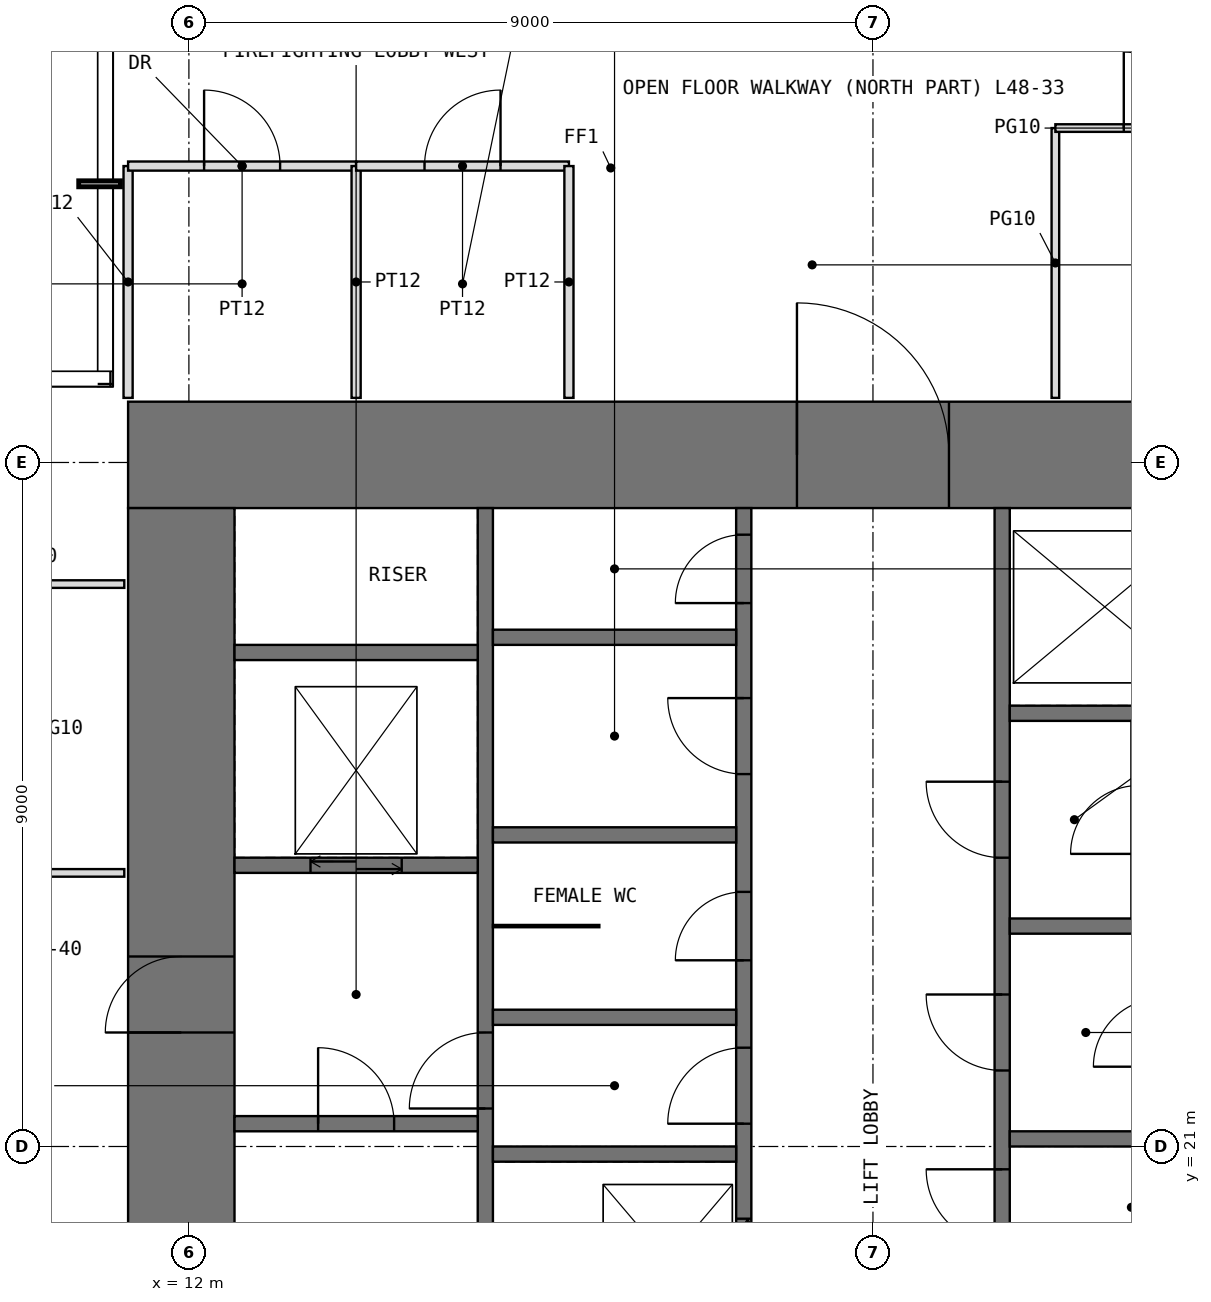
"""IFC4 building model, lengths in metres.
Left out: names, types, materials, properties, quantities, classifications, styles, units other than length and angle.
Written with IfcOpenShell. Run it as: python <this file> out.ifc"""

import sys

from ifc_helpers import new_model, si_unit, direction, frame, frame_2d, origin, place, context, subcontext, project, spatial, rectangle, extrude, element, fill, save


model = new_model("IFC4")
c1 = context("Model", 3, precision=1e-05, world=origin(), true_north=direction((0.0, 1.0)))
c2 = subcontext(c1, "Body", "Model", "MODEL_VIEW")
j1 = project(units=[si_unit("LENGTHUNIT", "METRE"), si_unit("PLANEANGLEUNIT", "RADIAN")], contexts=[c1])
p1 = place(None, origin())
s1 = spatial("IfcSite", under=j1, at=p1, CompositionType="ELEMENT")
p2 = place(p1, origin())
s2 = spatial("IfcBuilding", under=s1, at=p2, CompositionType="ELEMENT")
p3 = place(p2, frame((0.0, 0.0, 202.5)))
s3 = spatial("IfcBuildingStorey", under=s2, at=p3, CompositionType="ELEMENT", Elevation=202.5)
p4 = place(p3, frame((11.2, 30.1, -0.05), z_axis=(0.0, 0.0, 1.0), x_axis=(1.0, 0.0, 0.0)))
e1 = element("IfcWall", 1, at=p4, inside=s3, PredefinedType="SHEAR", context=c2, shape_type="SweptSolid", body=[
    extrude(rectangle(XDim=19.6, YDim=1.4, at=frame_2d((9.8, 0.0))), origin(), (0.0, 0.0, 1.0), 4.0),
])
p5 = place(p4, frame((8.8, 0.0, 0.05)))
e2 = element("IfcOpeningElement", 2, at=p5, cuts=e1, PredefinedType="OPENING", context=c2, shape_type="SweptSolid", body=[
    extrude(rectangle(XDim=2.0, YDim=2.2, at=frame_2d((1.0, 1.1))), frame((0.0, 0.71, 0.0), z_axis=(0.0, -1.0, 0.0), x_axis=(1.0, 0.0, 0.0)), (0.0, 0.0, 1.0), 1.42),
])
p6 = place(p3, frame((11.9, 12.6, -0.05), z_axis=(0.0, 0.0, 1.0), x_axis=(0.0, 1.0, 0.0)))
e3 = element("IfcWall", 3, at=p6, inside=s3, PredefinedType="SHEAR", context=c2, shape_type="SweptSolid", body=[
    extrude(rectangle(XDim=16.8, YDim=1.4, at=frame_2d((8.4, 0.0))), origin(), (0.0, 0.0, 1.0), 4.0),
])
p7 = place(p6, frame((9.9, 0.0, 0.05)))
e4 = element("IfcOpeningElement", 4, at=p7, cuts=e3, PredefinedType="OPENING", context=c2, shape_type="SweptSolid", body=[
    extrude(rectangle(XDim=1.0, YDim=2.2, at=frame_2d((0.5, 1.1))), frame((0.0, 0.71, 0.0), z_axis=(0.0, -1.0, 0.0), x_axis=(1.0, 0.0, 0.0)), (0.0, 0.0, 1.0), 1.42),
])
p8 = place(p3, frame((15.9, 12.6, -0.05), z_axis=(0.0, 0.0, 1.0), x_axis=(0.0, 1.0, 0.0)))
e5 = element("IfcWall", 5, at=p8, inside=s3, PredefinedType="SHEAR", context=c2, shape_type="SweptSolid", body=[
    extrude(rectangle(XDim=16.8, YDim=0.2, at=frame_2d((8.4, 0.0))), origin(), (0.0, 0.0, 1.0), 4.0),
])
p9 = place(p8, frame((8.9, 0.0, 0.05)))
e6 = element("IfcOpeningElement", 6, at=p9, cuts=e5, PredefinedType="OPENING", context=c2, shape_type="SweptSolid", body=[
    extrude(rectangle(XDim=1.0, YDim=2.2, at=frame_2d((0.5, 1.1))), frame((0.0, 0.11, 0.0), z_axis=(0.0, -1.0, 0.0), x_axis=(1.0, 0.0, 0.0)), (0.0, 0.0, 1.0), 0.22),
])
p10 = place(p3, frame((19.3, 12.6, -0.05), z_axis=(0.0, 0.0, 1.0), x_axis=(0.0, 1.0, 0.0)))
e7 = element("IfcWall", 7, at=p10, inside=s3, PredefinedType="SHEAR", context=c2, shape_type="SweptSolid", body=[
    extrude(rectangle(XDim=16.8, YDim=0.2, at=frame_2d((8.4, 0.0))), origin(), (0.0, 0.0, 1.0), 4.0),
])
p11 = place(p10, frame((8.7, 0.0, 0.05)))
e8 = element("IfcOpeningElement", 8, at=p11, cuts=e7, PredefinedType="OPENING", context=c2, shape_type="SweptSolid", body=[
    extrude(rectangle(XDim=1.0, YDim=2.2, at=frame_2d((0.5, 1.1))), frame((0.0, 0.11, 0.0), z_axis=(0.0, -1.0, 0.0), x_axis=(1.0, 0.0, 0.0)), (0.0, 0.0, 1.0), 0.22),
])
p12 = place(p10, frame((10.85, 0.0, 0.05)))
e9 = element("IfcOpeningElement", 9, at=p12, cuts=e7, PredefinedType="OPENING", context=c2, shape_type="SweptSolid", body=[
    extrude(rectangle(XDim=0.9, YDim=2.2, at=frame_2d((0.45, 1.1))), frame((0.0, 0.11, 0.0), z_axis=(0.0, -1.0, 0.0), x_axis=(1.0, 0.0, 0.0)), (0.0, 0.0, 1.0), 0.22),
])
p13 = place(p10, frame((13.3, 0.0, 0.05)))
e10 = element("IfcOpeningElement", 10, at=p13, cuts=e7, PredefinedType="OPENING", context=c2, shape_type="SweptSolid", body=[
    extrude(rectangle(XDim=1.0, YDim=2.2, at=frame_2d((0.5, 1.1))), frame((0.0, 0.11, 0.0), z_axis=(0.0, -1.0, 0.0), x_axis=(1.0, 0.0, 0.0)), (0.0, 0.0, 1.0), 0.22),
])
p14 = place(p10, frame((15.55, 0.0, 0.05)))
e11 = element("IfcOpeningElement", 11, at=p14, cuts=e7, PredefinedType="OPENING", context=c2, shape_type="SweptSolid", body=[
    extrude(rectangle(XDim=0.9, YDim=2.2, at=frame_2d((0.45, 1.1))), frame((0.0, 0.11, 0.0), z_axis=(0.0, -1.0, 0.0), x_axis=(1.0, 0.0, 0.0)), (0.0, 0.0, 1.0), 0.22),
])
p15 = place(p10, frame((0.75, 0.0, 0.05)))
e12 = element("IfcOpeningElement", 12, at=p15, cuts=e7, PredefinedType="OPENING", context=c2, shape_type="SweptSolid", body=[
    extrude(rectangle(XDim=1.1, YDim=2.2, at=frame_2d((0.55, 1.1))), frame((0.0, 0.11, 0.0), z_axis=(0.0, -1.0, 0.0), x_axis=(1.0, 0.0, 0.0)), (0.0, 0.0, 1.0), 0.22),
])
p16 = place(p10, frame((3.55, 0.0, 0.05)))
e13 = element("IfcOpeningElement", 13, at=p16, cuts=e7, PredefinedType="OPENING", context=c2, shape_type="SweptSolid", body=[
    extrude(rectangle(XDim=1.1, YDim=2.2, at=frame_2d((0.55, 1.1))), frame((0.0, 0.11, 0.0), z_axis=(0.0, -1.0, 0.0), x_axis=(1.0, 0.0, 0.0)), (0.0, 0.0, 1.0), 0.22),
])
p17 = place(p10, frame((6.35, 0.0, 0.05)))
e14 = element("IfcOpeningElement", 14, at=p17, cuts=e7, PredefinedType="OPENING", context=c2, shape_type="SweptSolid", body=[
    extrude(rectangle(XDim=1.1, YDim=2.2, at=frame_2d((0.55, 1.1))), frame((0.0, 0.11, 0.0), z_axis=(0.0, -1.0, 0.0), x_axis=(1.0, 0.0, 0.0)), (0.0, 0.0, 1.0), 0.22),
])
p18 = place(p3, frame((22.7, 12.6, -0.05), z_axis=(0.0, 0.0, 1.0), x_axis=(0.0, 1.0, 0.0)))
e15 = element("IfcWall", 15, at=p18, inside=s3, PredefinedType="SHEAR", context=c2, shape_type="SweptSolid", body=[
    extrude(rectangle(XDim=16.8, YDim=0.2, at=frame_2d((8.4, 0.0))), origin(), (0.0, 0.0, 1.0), 4.0),
])
p19 = place(p18, frame((7.1, 0.0, 0.05)))
e16 = element("IfcOpeningElement", 16, at=p19, cuts=e15, PredefinedType="OPENING", context=c2, shape_type="SweptSolid", body=[
    extrude(rectangle(XDim=1.0, YDim=2.2, at=frame_2d((0.5, 1.1))), frame((0.0, 0.11, 0.0), z_axis=(0.0, -1.0, 0.0), x_axis=(1.0, 0.0, 0.0)), (0.0, 0.0, 1.0), 0.22),
])
p20 = place(p18, frame((1.55, 0.0, 0.05)))
e17 = element("IfcOpeningElement", 17, at=p20, cuts=e15, PredefinedType="OPENING", context=c2, shape_type="SweptSolid", body=[
    extrude(rectangle(XDim=0.9, YDim=2.2, at=frame_2d((0.45, 1.1))), frame((0.0, 0.11, 0.0), z_axis=(0.0, -1.0, 0.0), x_axis=(1.0, 0.0, 0.0)), (0.0, 0.0, 1.0), 0.22),
])
p21 = place(p18, frame((4.95, 0.0, 0.05)))
e18 = element("IfcOpeningElement", 18, at=p21, cuts=e15, PredefinedType="OPENING", context=c2, shape_type="SweptSolid", body=[
    extrude(rectangle(XDim=0.9, YDim=2.2, at=frame_2d((0.45, 1.1))), frame((0.0, 0.11, 0.0), z_axis=(0.0, -1.0, 0.0), x_axis=(1.0, 0.0, 0.0)), (0.0, 0.0, 1.0), 0.22),
])
p22 = place(p18, frame((9.4, 0.0, 0.05)))
e19 = element("IfcOpeningElement", 19, at=p22, cuts=e15, PredefinedType="OPENING", context=c2, shape_type="SweptSolid", body=[
    extrude(rectangle(XDim=1.0, YDim=2.2, at=frame_2d((0.5, 1.1))), frame((0.0, 0.11, 0.0), z_axis=(0.0, -1.0, 0.0), x_axis=(1.0, 0.0, 0.0)), (0.0, 0.0, 1.0), 0.22),
])
p23 = place(p18, frame((12.2, 0.0, 0.05)))
e20 = element("IfcOpeningElement", 20, at=p23, cuts=e15, PredefinedType="OPENING", context=c2, shape_type="SweptSolid", body=[
    extrude(rectangle(XDim=1.0, YDim=2.2, at=frame_2d((0.5, 1.1))), frame((0.0, 0.11, 0.0), z_axis=(0.0, -1.0, 0.0), x_axis=(1.0, 0.0, 0.0)), (0.0, 0.0, 1.0), 0.22),
])
p24 = place(p3, frame((12.6, 21.3, -0.05), z_axis=(0.0, 0.0, 1.0), x_axis=(1.0, 0.0, 0.0)))
e21 = element("IfcWall", 21, at=p24, inside=s3, PredefinedType="SHEAR", context=c2, shape_type="SweptSolid", body=[
    extrude(rectangle(XDim=3.2, YDim=0.2, at=frame_2d((1.6, 0.0))), origin(), (0.0, 0.0, 1.0), 4.0),
])
p25 = place(p24, frame((1.1, 0.0, 0.05)))
e22 = element("IfcOpeningElement", 22, at=p25, cuts=e21, PredefinedType="OPENING", context=c2, shape_type="SweptSolid", body=[
    extrude(rectangle(XDim=1.0, YDim=2.2, at=frame_2d((0.5, 1.1))), frame((0.0, 0.11, 0.0), z_axis=(0.0, -1.0, 0.0), x_axis=(1.0, 0.0, 0.0)), (0.0, 0.0, 1.0), 0.22),
])
p26 = place(p3, frame((12.6, 24.7, -0.05), z_axis=(0.0, 0.0, 1.0), x_axis=(1.0, 0.0, 0.0)))
e23 = element("IfcWall", 23, at=p26, inside=s3, PredefinedType="SHEAR", context=c2, shape_type="SweptSolid", body=[
    extrude(rectangle(XDim=3.2, YDim=0.2, at=frame_2d((1.6, 0.0))), origin(), (0.0, 0.0, 1.0), 4.0),
])
p27 = place(p26, frame((1.0, 0.0, 0.05)))
e24 = element("IfcOpeningElement", 24, at=p27, cuts=e23, PredefinedType="OPENING", context=c2, shape_type="SweptSolid", body=[
    extrude(rectangle(XDim=1.2, YDim=2.2, at=frame_2d((0.6, 1.1))), frame((0.0, 0.11, 0.0), z_axis=(0.0, -1.0, 0.0), x_axis=(1.0, 0.0, 0.0)), (0.0, 0.0, 1.0), 0.22),
])
for number, where, z_axis, x_axis in (
    (25, (12.6, 27.5, -0.05), (0.0, 0.0, 1.0), (1.0, 0.0, 0.0)),
    (26, (16.0, 20.9, -0.05), (0.0, 0.0, 1.0), (1.0, 0.0, 0.0)),
    (27, (16.0, 22.7, -0.05), (0.0, 0.0, 1.0), (1.0, 0.0, 0.0)),
    (28, (16.0, 25.1, -0.05), (0.0, 0.0, 1.0), (1.0, 0.0, 0.0)),
    (29, (16.0, 27.7, -0.05), (0.0, 0.0, 1.0), (1.0, 0.0, 0.0)),
    (30, (22.8, 21.1, -0.05), (0.0, 0.0, 1.0), (1.0, 0.0, 0.0)),
    (31, (22.8, 23.9, -0.05), (0.0, 0.0, 1.0), (1.0, 0.0, 0.0)),
    (32, (22.8, 26.7, -0.05), (0.0, 0.0, 1.0), (1.0, 0.0, 0.0)),
):
    element("IfcWall", number, at=place(p3, frame(where, z_axis=z_axis, x_axis=x_axis)), inside=s3, PredefinedType="SHEAR", context=c2, shape_type="SweptSolid", body=[
        extrude(rectangle(XDim=3.2, YDim=0.2, at=frame_2d((1.6, 0.0))), origin(), (0.0, 0.0, 1.0), 4.0),
    ])
p28 = place(p3, frame((16.0, 23.9, 0.0), z_axis=(0.0, 0.0, 1.0), x_axis=(1.0, 0.0, 0.0)))
e33 = element("IfcWall", 33, at=p28, inside=s3, PredefinedType="PARTITIONING", context=c2, shape_type="SweptSolid", body=[
    extrude(rectangle(XDim=1.4, YDim=0.03, at=frame_2d((0.7, 0.0))), origin(), (0.0, 0.0, 1.0), 3.75),
])
for number, where, z_axis, x_axis in (
    (34, (8.4, 24.6, 0.0), (0.0, 0.0, 1.0), (1.0, 0.0, 0.0)),
    (35, (8.4, 28.4, 0.0), (0.0, 0.0, 1.0), (1.0, 0.0, 0.0)),
):
    element("IfcWall", number, at=place(p3, frame(where, z_axis=z_axis, x_axis=x_axis)), inside=s3, PredefinedType="PARTITIONING", context=c2, shape_type="SweptSolid", body=[
        extrude(rectangle(XDim=2.75, YDim=0.1, at=frame_2d((1.375, 0.0))), origin(), (0.0, 0.0, 1.0), 3.75),
    ])
p29 = place(p3, frame((11.2, 30.85, 0.0), z_axis=(0.0, 0.0, 1.0), x_axis=(0.0, 1.0, 0.0)))
e36 = element("IfcWall", 36, at=p29, inside=s3, PredefinedType="PARTITIONING", context=c2, shape_type="SweptSolid", body=[
    extrude(rectangle(XDim=3.05, YDim=0.12, at=frame_2d((1.525, 0.0))), origin(), (0.0, 0.0, 1.0), 3.75),
])
p30 = place(p3, frame((11.2, 33.9, 0.0), z_axis=(0.0, 0.0, 1.0), x_axis=(1.0, 0.0, 0.0)))
e37 = element("IfcWall", 37, at=p30, inside=s3, PredefinedType="PARTITIONING", context=c2, shape_type="SweptSolid", body=[
    extrude(rectangle(XDim=3.0, YDim=0.12, at=frame_2d((1.5, 0.0))), origin(), (0.0, 0.0, 1.0), 3.75),
])
p31 = place(p30, frame((1.0, 0.0, 0.0)))
e38 = element("IfcOpeningElement", 38, at=p31, cuts=e37, PredefinedType="OPENING", context=c2, shape_type="SweptSolid", body=[
    extrude(rectangle(XDim=1.0, YDim=2.2, at=frame_2d((0.5, 1.1))), frame((0.0, 0.07, 0.0), z_axis=(0.0, -1.0, 0.0), x_axis=(1.0, 0.0, 0.0)), (0.0, 0.0, 1.0), 0.14),
])
p32 = place(p3, frame((14.2, 30.85, 0.0), z_axis=(0.0, 0.0, 1.0), x_axis=(0.0, 1.0, 0.0)))
e39 = element("IfcWall", 39, at=p32, inside=s3, PredefinedType="PARTITIONING", context=c2, shape_type="SweptSolid", body=[
    extrude(rectangle(XDim=3.05, YDim=0.12, at=frame_2d((1.525, 0.0))), origin(), (0.0, 0.0, 1.0), 3.75),
])
p33 = place(p3, frame((14.2, 33.9, 0.0), z_axis=(0.0, 0.0, 1.0), x_axis=(1.0, 0.0, 0.0)))
e40 = element("IfcWall", 40, at=p33, inside=s3, PredefinedType="PARTITIONING", context=c2, shape_type="SweptSolid", body=[
    extrude(rectangle(XDim=2.8, YDim=0.12, at=frame_2d((1.4, 0.0))), origin(), (0.0, 0.0, 1.0), 3.75),
])
p34 = place(p33, frame((0.9, 0.0, 0.0)))
e41 = element("IfcOpeningElement", 41, at=p34, cuts=e40, PredefinedType="OPENING", context=c2, shape_type="SweptSolid", body=[
    extrude(rectangle(XDim=1.0, YDim=2.2, at=frame_2d((0.5, 1.1))), frame((0.0, 0.07, 0.0), z_axis=(0.0, -1.0, 0.0), x_axis=(1.0, 0.0, 0.0)), (0.0, 0.0, 1.0), 0.14),
])
p35 = place(p3, frame((17.0, 30.85, 0.0), z_axis=(0.0, 0.0, 1.0), x_axis=(0.0, 1.0, 0.0)))
e42 = element("IfcWall", 42, at=p35, inside=s3, PredefinedType="PARTITIONING", context=c2, shape_type="SweptSolid", body=[
    extrude(rectangle(XDim=3.05, YDim=0.12, at=frame_2d((1.525, 0.0))), origin(), (0.0, 0.0, 1.0), 3.75),
])
p36 = place(p3, frame((23.4, 30.85, 0.0), z_axis=(0.0, 0.0, 1.0), x_axis=(0.0, 1.0, 0.0)))
e43 = element("IfcWall", 43, at=p36, inside=s3, PredefinedType="PARTITIONING", context=c2, shape_type="SweptSolid", body=[
    extrude(rectangle(XDim=3.55, YDim=0.1, at=frame_2d((1.775, 0.0))), origin(), (0.0, 0.0, 1.0), 3.75),
])
p37 = place(p3, frame((23.4, 34.4, 0.0), z_axis=(0.0, 0.0, 1.0), x_axis=(1.0, 0.0, 0.0)))
e44 = element("IfcWall", 44, at=p37, inside=s3, PredefinedType="PARTITIONING", context=c2, shape_type="SweptSolid", body=[
    extrude(rectangle(XDim=2.8, YDim=0.1, at=frame_2d((1.4, 0.0))), origin(), (0.0, 0.0, 1.0), 3.75),
])
p38 = place(p37, frame((0.9, 0.0, 0.0)))
e45 = element("IfcOpeningElement", 45, at=p38, cuts=e44, PredefinedType="OPENING", context=c2, shape_type="SweptSolid", body=[
    extrude(rectangle(XDim=1.0, YDim=2.4, at=frame_2d((0.5, 1.2))), frame((0.0, 0.06, 0.0), z_axis=(0.0, -1.0, 0.0), x_axis=(1.0, 0.0, 0.0)), (0.0, 0.0, 1.0), 0.12),
])
p39 = place(p5, origin())
e46 = element("IfcDoor", 46, at=p39, inside=s3, OperationType="DOUBLE_DOOR_SINGLE_SWING", PredefinedType="DOOR", context=c2, shape_type="SweptSolid", body=[
    extrude(rectangle(XDim=2.0, YDim=2.2, at=frame_2d((1.0, 1.1))), frame((0.0, 0.025, 0.0), z_axis=(0.0, -1.0, 0.0), x_axis=(1.0, 0.0, 0.0)), (0.0, 0.0, 1.0), 0.05),
])
fill(e2, e46)
p40 = place(p7, origin())
e47 = element("IfcDoor", 47, at=p40, inside=s3, OperationType="SINGLE_SWING_LEFT", PredefinedType="DOOR", context=c2, shape_type="SweptSolid", body=[
    extrude(rectangle(XDim=1.0, YDim=2.2, at=frame_2d((0.5, 1.1))), frame((0.0, 0.025, 0.0), z_axis=(0.0, -1.0, 0.0), x_axis=(1.0, 0.0, 0.0)), (0.0, 0.0, 1.0), 0.05),
])
fill(e4, e47)
p41 = place(p25, origin())
e48 = element("IfcDoor", 48, at=p41, inside=s3, OperationType="SINGLE_SWING_LEFT", PredefinedType="DOOR", context=c2, shape_type="SweptSolid", body=[
    extrude(rectangle(XDim=1.0, YDim=2.2, at=frame_2d((0.5, 1.1))), frame((0.0, 0.025, 0.0), z_axis=(0.0, -1.0, 0.0), x_axis=(1.0, 0.0, 0.0)), (0.0, 0.0, 1.0), 0.05),
])
fill(e22, e48)
p42 = place(p9, origin())
e49 = element("IfcDoor", 49, at=p42, inside=s3, OperationType="SINGLE_SWING_LEFT", PredefinedType="DOOR", context=c2, shape_type="SweptSolid", body=[
    extrude(rectangle(XDim=1.0, YDim=2.2, at=frame_2d((0.5, 1.1))), frame((0.0, 0.025, 0.0), z_axis=(0.0, -1.0, 0.0), x_axis=(1.0, 0.0, 0.0)), (0.0, 0.0, 1.0), 0.05),
])
fill(e6, e49)
p43 = place(p11, origin())
e50 = element("IfcDoor", 50, at=p43, inside=s3, OperationType="SINGLE_SWING_LEFT", PredefinedType="DOOR", context=c2, shape_type="SweptSolid", body=[
    extrude(rectangle(XDim=1.0, YDim=2.2, at=frame_2d((0.5, 1.1))), frame((0.0, 0.025, 0.0), z_axis=(0.0, -1.0, 0.0), x_axis=(1.0, 0.0, 0.0)), (0.0, 0.0, 1.0), 0.05),
])
fill(e8, e50)
p44 = place(p19, origin())
e51 = element("IfcDoor", 51, at=p44, inside=s3, OperationType="SINGLE_SWING_RIGHT", PredefinedType="DOOR", context=c2, shape_type="SweptSolid", body=[
    extrude(rectangle(XDim=1.0, YDim=2.2, at=frame_2d((0.5, 1.1))), frame((0.0, 0.025, 0.0), z_axis=(0.0, -1.0, 0.0), x_axis=(1.0, 0.0, 0.0)), (0.0, 0.0, 1.0), 0.05),
])
fill(e16, e51)
p45 = place(p12, origin())
e52 = element("IfcDoor", 52, at=p45, inside=s3, OperationType="SINGLE_SWING_LEFT", PredefinedType="DOOR", context=c2, shape_type="SweptSolid", body=[
    extrude(rectangle(XDim=0.9, YDim=2.2, at=frame_2d((0.45, 1.1))), frame((0.0, 0.025, 0.0), z_axis=(0.0, -1.0, 0.0), x_axis=(1.0, 0.0, 0.0)), (0.0, 0.0, 1.0), 0.05),
])
fill(e9, e52)
p46 = place(p13, origin())
e53 = element("IfcDoor", 53, at=p46, inside=s3, OperationType="SINGLE_SWING_RIGHT", PredefinedType="DOOR", context=c2, shape_type="SweptSolid", body=[
    extrude(rectangle(XDim=1.0, YDim=2.2, at=frame_2d((0.5, 1.1))), frame((0.0, 0.025, 0.0), z_axis=(0.0, -1.0, 0.0), x_axis=(1.0, 0.0, 0.0)), (0.0, 0.0, 1.0), 0.05),
])
fill(e10, e53)
p47 = place(p14, origin())
e54 = element("IfcDoor", 54, at=p47, inside=s3, OperationType="SINGLE_SWING_LEFT", PredefinedType="DOOR", context=c2, shape_type="SweptSolid", body=[
    extrude(rectangle(XDim=0.9, YDim=2.2, at=frame_2d((0.45, 1.1))), frame((0.0, 0.025, 0.0), z_axis=(0.0, -1.0, 0.0), x_axis=(1.0, 0.0, 0.0)), (0.0, 0.0, 1.0), 0.05),
])
fill(e11, e54)
p48 = place(p22, origin())
e55 = element("IfcDoor", 55, at=p48, inside=s3, OperationType="SINGLE_SWING_RIGHT", PredefinedType="DOOR", context=c2, shape_type="SweptSolid", body=[
    extrude(rectangle(XDim=1.0, YDim=2.2, at=frame_2d((0.5, 1.1))), frame((0.0, 0.025, 0.0), z_axis=(0.0, -1.0, 0.0), x_axis=(1.0, 0.0, 0.0)), (0.0, 0.0, 1.0), 0.05),
])
fill(e19, e55)
p49 = place(p23, origin())
e56 = element("IfcDoor", 56, at=p49, inside=s3, OperationType="SINGLE_SWING_RIGHT", PredefinedType="DOOR", context=c2, shape_type="SweptSolid", body=[
    extrude(rectangle(XDim=1.0, YDim=2.2, at=frame_2d((0.5, 1.1))), frame((0.0, 0.025, 0.0), z_axis=(0.0, -1.0, 0.0), x_axis=(1.0, 0.0, 0.0)), (0.0, 0.0, 1.0), 0.05),
])
fill(e20, e56)
p50 = place(p31, origin())
e57 = element("IfcDoor", 57, at=p50, inside=s3, OperationType="SINGLE_SWING_LEFT", PredefinedType="DOOR", context=c2, shape_type="SweptSolid", body=[
    extrude(rectangle(XDim=1.0, YDim=2.2, at=frame_2d((0.5, 1.1))), frame((0.0, 0.025, 0.0), z_axis=(0.0, -1.0, 0.0), x_axis=(1.0, 0.0, 0.0)), (0.0, 0.0, 1.0), 0.05),
])
fill(e38, e57)
p51 = place(p34, origin())
e58 = element("IfcDoor", 58, at=p51, inside=s3, OperationType="SINGLE_SWING_RIGHT", PredefinedType="DOOR", context=c2, shape_type="SweptSolid", body=[
    extrude(rectangle(XDim=1.0, YDim=2.2, at=frame_2d((0.5, 1.1))), frame((0.0, 0.025, 0.0), z_axis=(0.0, -1.0, 0.0), x_axis=(1.0, 0.0, 0.0)), (0.0, 0.0, 1.0), 0.05),
])
fill(e41, e58)
p52 = place(p38, origin())
e59 = element("IfcDoor", 59, at=p52, inside=s3, OperationType="SINGLE_SWING_LEFT", PredefinedType="DOOR", context=c2, shape_type="SweptSolid", body=[
    extrude(rectangle(XDim=1.0, YDim=2.4, at=frame_2d((0.5, 1.2))), frame((0.0, 0.025, 0.0), z_axis=(0.0, -1.0, 0.0), x_axis=(1.0, 0.0, 0.0)), (0.0, 0.0, 1.0), 0.05),
])
fill(e45, e59)
p53 = place(p17, origin())
e60 = element("IfcDoor", 60, at=p53, inside=s3, OperationType="DOUBLE_DOOR_SLIDING", PredefinedType="DOOR", context=c2, shape_type="SweptSolid", body=[
    extrude(rectangle(XDim=1.1, YDim=2.2, at=frame_2d((0.55, 1.1))), frame((0.0, 0.025, 0.0), z_axis=(0.0, -1.0, 0.0), x_axis=(1.0, 0.0, 0.0)), (0.0, 0.0, 1.0), 0.05),
])
fill(e14, e60)
p54 = place(p27, origin())
e61 = element("IfcDoor", 61, at=p54, inside=s3, OperationType="DOUBLE_DOOR_SLIDING", PredefinedType="DOOR", context=c2, shape_type="SweptSolid", body=[
    extrude(rectangle(XDim=1.2, YDim=2.2, at=frame_2d((0.6, 1.1))), frame((0.0, 0.025, 0.0), z_axis=(0.0, -1.0, 0.0), x_axis=(1.0, 0.0, 0.0)), (0.0, 0.0, 1.0), 0.05),
])
fill(e24, e61)
save(model, sys.argv[1])
